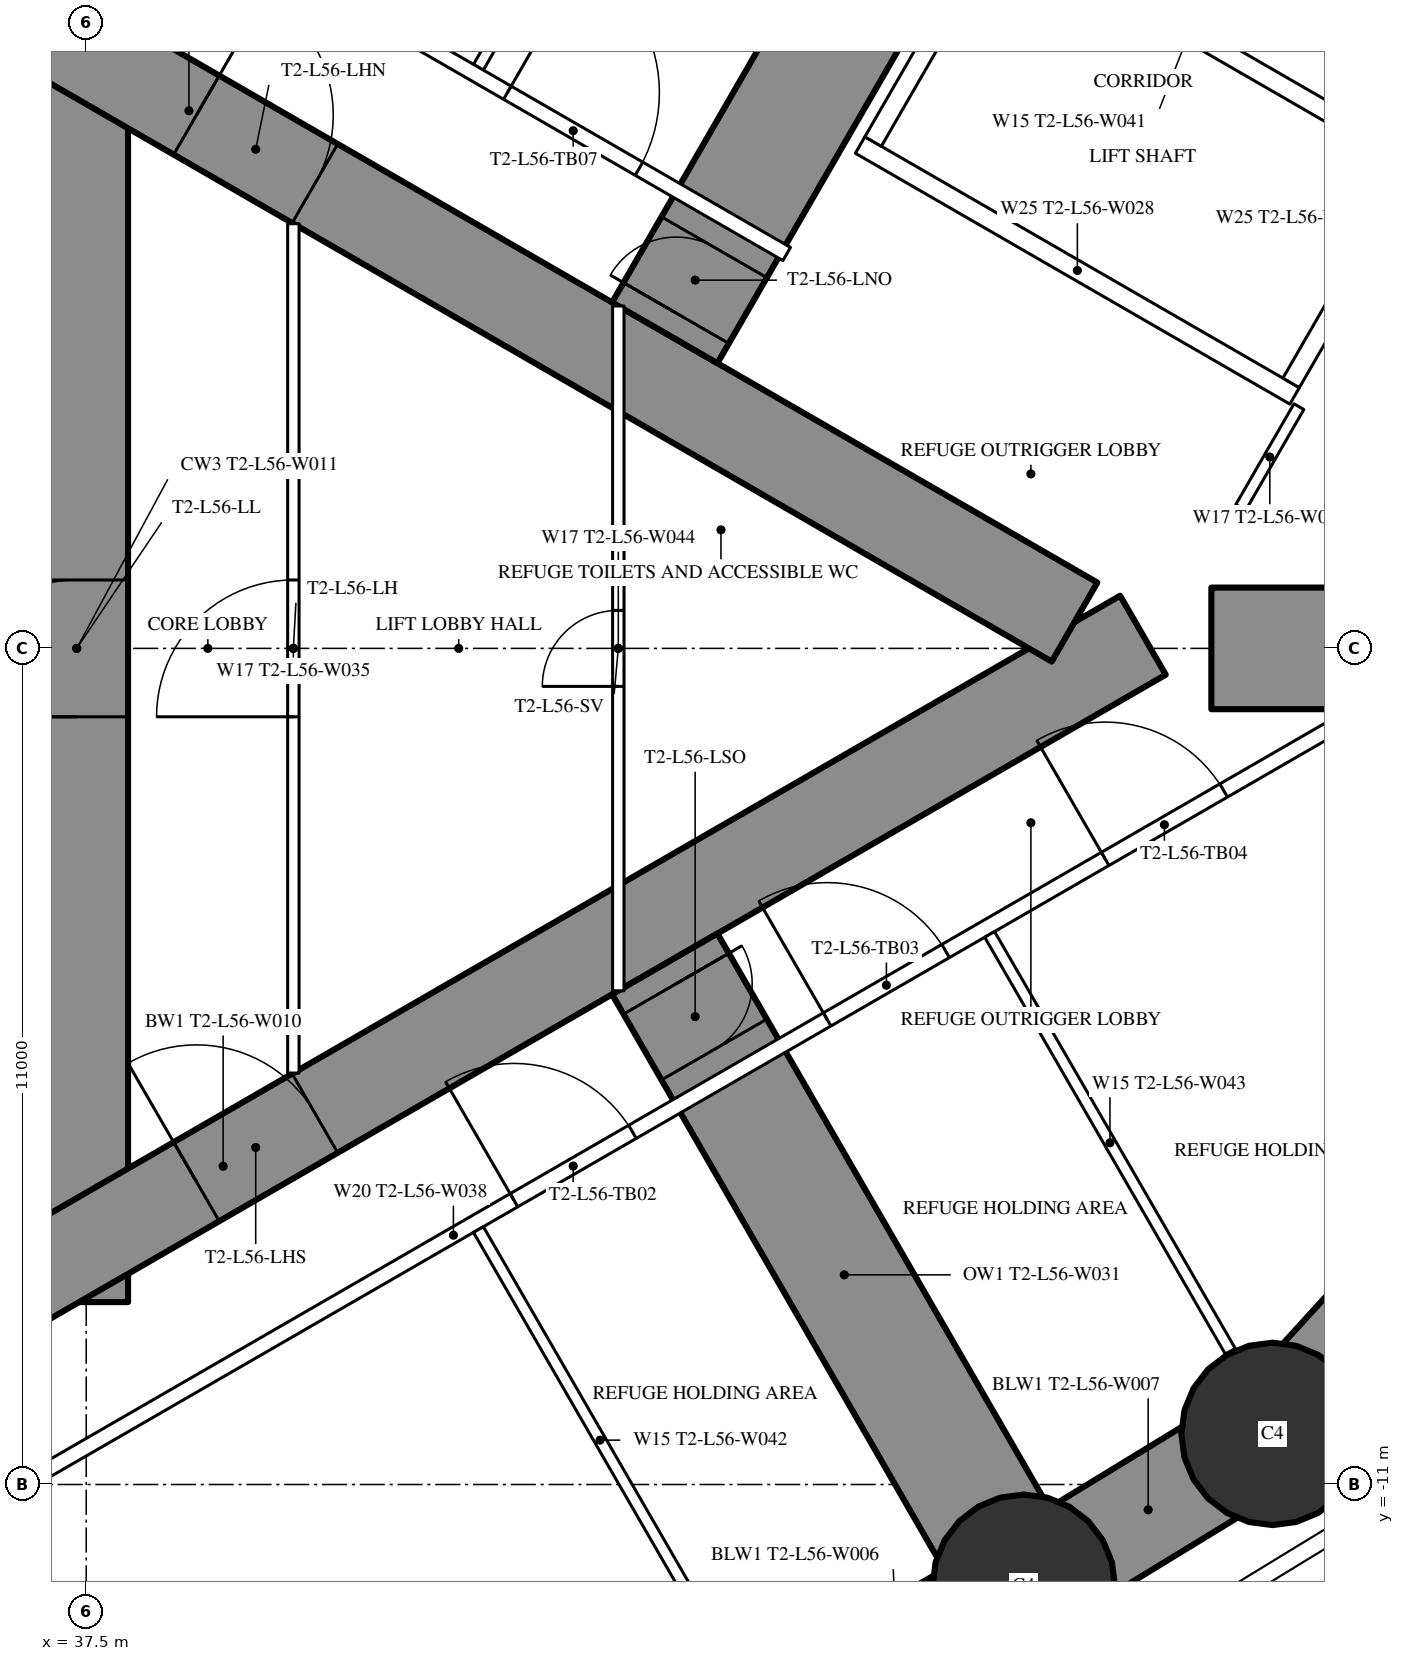
"""IFC4 building model, lengths in metres.
Left out: names, types, materials, properties, quantities, classifications, styles, units other than length and angle.
Written with IfcOpenShell. Run it as: python <this file> out.ifc"""

import sys

from ifc_helpers import new_model, si_unit, direction, frame, frame_2d, origin, origin_2d, place, context, subcontext, project, spatial, rectangle, circle, extrude, element, fill, save


model = new_model("IFC4")
c1 = context("Model", 3, precision=1e-05, world=origin(), true_north=direction((0.0, 1.0)))
c2 = subcontext(c1, "Body", "Model", "MODEL_VIEW")
j1 = project(units=[si_unit("LENGTHUNIT", "METRE"), si_unit("PLANEANGLEUNIT", "RADIAN")], contexts=[c1])
p1 = place(None, origin())
s1 = spatial("IfcSite", under=j1, at=p1, CompositionType="ELEMENT")
p2 = place(p1, origin())
s2 = spatial("IfcBuilding", under=s1, at=p2, CompositionType="ELEMENT")
p3 = place(p2, frame((0.0, 0.0, 210.3)))
s3 = spatial("IfcBuildingStorey", under=s2, at=p3, CompositionType="ELEMENT", Elevation=210.3)
for number, where, z_axis, x_axis in (
    (1, (49.834, -12.332, 0.0), (0.0, 0.0, 1.0), (1.0, 0.0, 0.0)),
    (2, (53.108, -10.334, 0.0), (0.0, 0.0, 1.0), (1.0, 0.0, 0.0)),
):
    element("IfcColumn", number, at=place(p3, frame(where, z_axis=z_axis, x_axis=x_axis)), inside=s3, PredefinedType="COLUMN", context=c2, shape_type="SweptSolid", body=[
        extrude(circle(Radius=1.2, at=origin_2d()), origin(), (0.0, 0.0, 1.0), 5.0),
    ])
p4 = place(p3, frame((37.375, -8.6, 0.0), z_axis=(0.0, 0.0, 1.0), x_axis=(0.0, 1.0, 0.0)))
e3 = element("IfcWall", 3, at=p4, inside=s3, PredefinedType="SHEAR", context=c2, shape_type="SweptSolid", body=[
    extrude(rectangle(XDim=17.2, YDim=1.35, at=frame_2d((8.6, 0.0))), origin(), (0.0, 0.0, 1.0), 5.0),
])
p5 = place(p4, frame((7.7, 0.0, 0.0)))
e4 = element("IfcOpeningElement", 4, at=p5, cuts=e3, PredefinedType="OPENING", context=c2, shape_type="SweptSolid", body=[
    extrude(rectangle(XDim=1.8, YDim=2.2, at=frame_2d((0.9, 1.1))), frame((0.0, 0.685, 0.0), z_axis=(0.0, -1.0, 0.0), x_axis=(1.0, 0.0, 0.0)), (0.0, 0.0, 1.0), 1.37),
])
p6 = place(p3, frame((27.2, -13.8, 0.0), z_axis=(0.0, 0.0, 1.0), x_axis=(0.866027159892, 0.499996958321, 0.0)))
e5 = element("IfcWall", 5, at=p6, inside=s3, PredefinedType="SHEAR", context=c2, shape_type="SweptSolid", body=[
    extrude(rectangle(XDim=27.947, YDim=1.2, at=frame_2d((13.973, 0.0))), origin(), (0.0, 0.0, 1.0), 5.0),
])
p7 = place(p6, frame((6.5, 0.0, 0.0)))
e6 = element("IfcOpeningElement", 6, at=p7, cuts=e5, PredefinedType="OPENING", context=c2, shape_type="SweptSolid", body=[
    extrude(rectangle(XDim=1.0, YDim=2.2, at=frame_2d((0.5, 1.1))), frame((0.0, 0.61, 0.0), z_axis=(0.0, -1.0, 0.0), x_axis=(1.0, 0.0, 0.0)), (0.0, 0.0, 1.0), 1.22),
])
p8 = place(p6, frame((13.568, 0.0, 0.0)))
e7 = element("IfcOpeningElement", 7, at=p8, cuts=e5, PredefinedType="OPENING", context=c2, shape_type="SweptSolid", body=[
    extrude(rectangle(XDim=1.8, YDim=2.2, at=frame_2d((0.9, 1.1))), frame((0.0, 0.61, 0.0), z_axis=(0.0, -1.0, 0.0), x_axis=(1.0, 0.0, 0.0)), (0.0, 0.0, 1.0), 1.22),
])
p9 = place(p3, frame((27.2, 13.8, 0.0), z_axis=(0.0, 0.0, 1.0), x_axis=(0.866024515034, -0.500001539357, 0.0)))
e8 = element("IfcWall", 8, at=p9, inside=s3, PredefinedType="SHEAR", context=c2, shape_type="SweptSolid", body=[
    extrude(rectangle(XDim=26.907, YDim=1.2, at=frame_2d((13.454, 0.0))), origin(), (0.0, 0.0, 1.0), 5.0),
])
p10 = place(p9, frame((6.5, 0.0, 0.0)))
e9 = element("IfcOpeningElement", 9, at=p10, cuts=e8, PredefinedType="OPENING", context=c2, shape_type="SweptSolid", body=[
    extrude(rectangle(XDim=1.0, YDim=2.2, at=frame_2d((0.5, 1.1))), frame((0.0, 0.61, 0.0), z_axis=(0.0, -1.0, 0.0), x_axis=(1.0, 0.0, 0.0)), (0.0, 0.0, 1.0), 1.22),
])
p11 = place(p9, frame((13.568, 0.0, 0.0)))
e10 = element("IfcOpeningElement", 10, at=p11, cuts=e8, PredefinedType="OPENING", context=c2, shape_type="SweptSolid", body=[
    extrude(rectangle(XDim=1.8, YDim=2.2, at=frame_2d((0.9, 1.1))), frame((0.0, 0.61, 0.0), z_axis=(0.0, -1.0, 0.0), x_axis=(1.0, 0.0, 0.0)), (0.0, 0.0, 1.0), 1.22),
])
p12 = place(p3, frame((45.111, -4.152, 0.0), z_axis=(0.0, 0.0, 1.0), x_axis=(0.499986466662, -0.86603321712, 0.0)))
e11 = element("IfcWall", 11, at=p12, inside=s3, PredefinedType="SHEAR", context=c2, shape_type="SweptSolid", body=[
    extrude(rectangle(XDim=9.446, YDim=1.6, at=frame_2d((4.723, 0.0))), origin(), (0.0, 0.0, 1.0), 5.0),
])
p13 = place(p12, frame((0.3, 0.0, 0.0)))
e12 = element("IfcOpeningElement", 12, at=p13, cuts=e11, PredefinedType="OPENING", context=c2, shape_type="SweptSolid", body=[
    extrude(rectangle(XDim=1.0, YDim=2.2, at=frame_2d((0.5, 1.1))), frame((0.0, 0.81, 0.0), z_axis=(0.0, -1.0, 0.0), x_axis=(1.0, 0.0, 0.0)), (0.0, 0.0, 1.0), 1.62),
])
p14 = place(p3, frame((52.302, 0.0, 0.0), z_axis=(0.0, 0.0, 1.0), x_axis=(1.0, 0.0, 0.0)))
e13 = element("IfcWall", 13, at=p14, inside=s3, PredefinedType="SHEAR", context=c2, shape_type="SweptSolid", body=[
    extrude(rectangle(XDim=10.239, YDim=1.6, at=frame_2d((5.12, 0.0))), origin(), (0.0, 0.0, 1.0), 5.0),
])
p15 = place(p3, frame((45.111, 4.152, 0.0), z_axis=(0.0, 0.0, 1.0), x_axis=(0.499986466662, 0.86603321712, 0.0)))
e14 = element("IfcWall", 14, at=p15, inside=s3, PredefinedType="SHEAR", context=c2, shape_type="SweptSolid", body=[
    extrude(rectangle(XDim=9.446, YDim=1.6, at=frame_2d((4.723, 0.0))), origin(), (0.0, 0.0, 1.0), 5.0),
])
p16 = place(p15, frame((0.3, 0.0, 0.0)))
e15 = element("IfcOpeningElement", 15, at=p16, cuts=e14, PredefinedType="OPENING", context=c2, shape_type="SweptSolid", body=[
    extrude(rectangle(XDim=1.0, YDim=2.2, at=frame_2d((0.5, 1.1))), frame((0.0, 0.81, 0.0), z_axis=(0.0, -1.0, 0.0), x_axis=(1.0, 0.0, 0.0)), (0.0, 0.0, 1.0), 1.62),
])
p17 = place(p3, frame((46.499, -14.226, 0.0), z_axis=(0.0, 0.0, 1.0), x_axis=(0.869560321562, 0.493826738001, 0.0)))
e16 = element("IfcWall", 16, at=p17, inside=s3, PredefinedType="SHEAR", context=c2, shape_type="SweptSolid", body=[
    extrude(rectangle(XDim=3.835, YDim=1.4, at=frame_2d((1.917, 0.0))), origin(), (0.0, 0.0, 1.0), 5.0),
])
p18 = place(p3, frame((49.834, -12.332, 0.0), z_axis=(0.0, 0.0, 1.0), x_axis=(0.853604257265, 0.520922040212, 0.0)))
e17 = element("IfcWall", 17, at=p18, inside=s3, PredefinedType="SHEAR", context=c2, shape_type="SweptSolid", body=[
    extrude(rectangle(XDim=3.835, YDim=1.4, at=frame_2d((1.917, 0.0))), origin(), (0.0, 0.0, 1.0), 5.0),
])
p19 = place(p3, frame((53.108, -10.334, 0.0), z_axis=(0.0, 0.0, 1.0), x_axis=(0.674209372947, 0.738540263919, 0.0)))
e18 = element("IfcWall", 18, at=p19, inside=s3, PredefinedType="SHEAR", context=c2, shape_type="SweptSolid", body=[
    extrude(rectangle(XDim=13.992, YDim=1.4, at=frame_2d((6.996, 0.0))), origin(), (0.0, 0.0, 1.0), 5.0),
])
p20 = place(p19, frame((5.496, 0.0, 0.6)))
e19 = element("IfcOpeningElement", 19, at=p20, cuts=e18, PredefinedType="OPENING", context=c2, shape_type="SweptSolid", body=[
    extrude(rectangle(XDim=3.0, YDim=1.2, at=frame_2d((1.5, 0.6))), frame((0.0, 0.71, 0.0), z_axis=(0.0, -1.0, 0.0), x_axis=(1.0, 0.0, 0.0)), (0.0, 0.0, 1.0), 1.42),
])
p21 = place(p3, frame((62.542, 0.0, 0.0), z_axis=(0.0, 0.0, 1.0), x_axis=(-0.674209372947, 0.738540263919, 0.0)))
e20 = element("IfcWall", 20, at=p21, inside=s3, PredefinedType="SHEAR", context=c2, shape_type="SweptSolid", body=[
    extrude(rectangle(XDim=13.992, YDim=1.4, at=frame_2d((6.996, 0.0))), origin(), (0.0, 0.0, 1.0), 5.0),
])
p22 = place(p21, frame((5.496, 0.0, 0.6)))
e21 = element("IfcOpeningElement", 21, at=p22, cuts=e20, PredefinedType="OPENING", context=c2, shape_type="SweptSolid", body=[
    extrude(rectangle(XDim=3.0, YDim=1.2, at=frame_2d((1.5, 0.6))), frame((0.0, 0.71, 0.0), z_axis=(0.0, -1.0, 0.0), x_axis=(1.0, 0.0, 0.0)), (0.0, 0.0, 1.0), 1.42),
])
p23 = place(p3, frame((28.959, -15.44, 0.0), z_axis=(0.0, 0.0, 1.0), x_axis=(0.866025227435, 0.500000305447, 0.0)))
e22 = element("IfcWall", 22, at=p23, inside=s3, PredefinedType="PARTITIONING", context=c2, shape_type="SweptSolid", body=[
    extrude(rectangle(XDim=30.88, YDim=0.2, at=frame_2d((15.44, 0.0))), origin(), (0.0, 0.0, 1.0), 4.75),
])
p24 = place(p23, frame((6.994, 0.0, 0.0)))
e23 = element("IfcOpeningElement", 23, at=p24, cuts=e22, PredefinedType="OPENING", context=c2, shape_type="SweptSolid", body=[
    extrude(rectangle(XDim=2.0, YDim=2.4, at=frame_2d((1.0, 1.2))), frame((0.0, 0.11, 0.0), z_axis=(0.0, -1.0, 0.0), x_axis=(1.0, 0.0, 0.0)), (0.0, 0.0, 1.0), 0.22),
])
p25 = place(p23, frame((16.36, 0.0, 0.0)))
e24 = element("IfcOpeningElement", 24, at=p25, cuts=e22, PredefinedType="OPENING", context=c2, shape_type="SweptSolid", body=[
    extrude(rectangle(XDim=1.8, YDim=2.2, at=frame_2d((0.9, 1.1))), frame((0.0, 0.11, 0.0), z_axis=(0.0, -1.0, 0.0), x_axis=(1.0, 0.0, 0.0)), (0.0, 0.0, 1.0), 0.22),
])
p26 = place(p23, frame((21.118, 0.0, 0.0)))
e25 = element("IfcOpeningElement", 25, at=p26, cuts=e22, PredefinedType="OPENING", context=c2, shape_type="SweptSolid", body=[
    extrude(rectangle(XDim=1.8, YDim=2.2, at=frame_2d((0.9, 1.1))), frame((0.0, 0.11, 0.0), z_axis=(0.0, -1.0, 0.0), x_axis=(1.0, 0.0, 0.0)), (0.0, 0.0, 1.0), 0.22),
])
p27 = place(p23, frame((25.341, 0.0, 0.0)))
e26 = element("IfcOpeningElement", 26, at=p27, cuts=e22, PredefinedType="OPENING", context=c2, shape_type="SweptSolid", body=[
    extrude(rectangle(XDim=1.8, YDim=2.2, at=frame_2d((0.9, 1.1))), frame((0.0, 0.11, 0.0), z_axis=(0.0, -1.0, 0.0), x_axis=(1.0, 0.0, 0.0)), (0.0, 0.0, 1.0), 0.22),
])
p28 = place(p3, frame((42.66, -7.646, 0.0), z_axis=(0.0, 0.0, 1.0), x_axis=(0.499996592859, -0.866027370889, 0.0)))
e27 = element("IfcWall", 27, at=p28, inside=s3, PredefinedType="PARTITIONING", context=c2, shape_type="SweptSolid", body=[
    extrude(rectangle(XDim=6.398, YDim=0.15, at=frame_2d((3.199, 0.0))), origin(), (0.0, 0.0, 1.0), 3.85),
])
p29 = place(p3, frame((49.385, -3.763, 0.0), z_axis=(0.0, 0.0, 1.0), x_axis=(0.499999447814, -0.866025722589, 0.0)))
e28 = element("IfcWall", 28, at=p29, inside=s3, PredefinedType="PARTITIONING", context=c2, shape_type="SweptSolid", body=[
    extrude(rectangle(XDim=6.333, YDim=0.15, at=frame_2d((3.166, 0.0))), origin(), (0.0, 0.0, 1.0), 3.85),
])
p30 = place(p3, frame((42.66, 7.646, 0.0), z_axis=(0.0, 0.0, 1.0), x_axis=(0.499996592859, 0.866027370889, 0.0)))
e29 = element("IfcWall", 29, at=p30, inside=s3, PredefinedType="PARTITIONING", context=c2, shape_type="SweptSolid", body=[
    extrude(rectangle(XDim=6.398, YDim=0.15, at=frame_2d((3.199, 0.0))), origin(), (0.0, 0.0, 1.0), 3.85),
])
p31 = place(p3, frame((28.959, 15.44, 0.0), z_axis=(0.0, 0.0, 1.0), x_axis=(0.866028936079, -0.499993881836, 0.0)))
e30 = element("IfcWall", 30, at=p31, inside=s3, PredefinedType="PARTITIONING", context=c2, shape_type="SweptSolid", body=[
    extrude(rectangle(XDim=20.503, YDim=0.2, at=frame_2d((10.251, 0.0))), origin(), (0.0, 0.0, 1.0), 4.75),
])
p32 = place(p31, frame((16.26, 0.0, 0.0)))
e31 = element("IfcOpeningElement", 31, at=p32, cuts=e30, PredefinedType="OPENING", context=c2, shape_type="SweptSolid", body=[
    extrude(rectangle(XDim=2.0, YDim=2.4, at=frame_2d((1.0, 1.2))), frame((0.0, 0.11, 0.0), z_axis=(0.0, -1.0, 0.0), x_axis=(1.0, 0.0, 0.0)), (0.0, 0.0, 1.0), 0.22),
])
p33 = place(p31, frame((7.094, 0.0, 0.0)))
e32 = element("IfcOpeningElement", 32, at=p33, cuts=e30, PredefinedType="OPENING", context=c2, shape_type="SweptSolid", body=[
    extrude(rectangle(XDim=1.8, YDim=2.2, at=frame_2d((0.9, 1.1))), frame((0.0, 0.11, 0.0), z_axis=(0.0, -1.0, 0.0), x_axis=(1.0, 0.0, 0.0)), (0.0, 0.0, 1.0), 0.22),
])
p34 = place(p3, frame((52.689, 1.855, 0.0), z_axis=(0.0, 0.0, 1.0), x_axis=(0.500035603698, 0.866004847004, 0.0)))
e33 = element("IfcWall", 33, at=p34, inside=s3, PredefinedType="PARTITIONING", context=c2, shape_type="SweptSolid", body=[
    extrude(rectangle(XDim=1.53, YDim=0.15, at=frame_2d((0.765, 0.0))), origin(), (0.0, 0.0, 1.0), 4.75),
])
p35 = place(p3, frame((40.225, -5.587, 0.0), z_axis=(0.0, 0.0, 1.0), x_axis=(0.0, 1.0, 0.0)))
e34 = element("IfcWall", 34, at=p35, inside=s3, PredefinedType="PARTITIONING", context=c2, shape_type="SweptSolid", body=[
    extrude(rectangle(XDim=11.174, YDim=0.15, at=frame_2d((5.587, 0.0))), origin(), (0.0, 0.0, 1.0), 4.75),
])
p36 = place(p35, frame((4.687, 0.0, 0.0)))
e35 = element("IfcOpeningElement", 35, at=p36, cuts=e34, PredefinedType="OPENING", context=c2, shape_type="SweptSolid", body=[
    extrude(rectangle(XDim=1.8, YDim=2.2, at=frame_2d((0.9, 1.1))), frame((0.0, 0.085, 0.0), z_axis=(0.0, -1.0, 0.0), x_axis=(1.0, 0.0, 0.0)), (0.0, 0.0, 1.0), 0.17),
])
p37 = place(p3, frame((44.5, -4.505, 0.0), z_axis=(0.0, 0.0, 1.0), x_axis=(0.0, 1.0, 0.0)))
e36 = element("IfcWall", 36, at=p37, inside=s3, PredefinedType="PARTITIONING", context=c2, shape_type="SweptSolid", body=[
    extrude(rectangle(XDim=9.009, YDim=0.15, at=frame_2d((4.505, 0.0))), origin(), (0.0, 0.0, 1.0), 4.75),
])
p38 = place(p37, frame((4.005, 0.0, 0.0)))
e37 = element("IfcOpeningElement", 37, at=p38, cuts=e36, PredefinedType="OPENING", context=c2, shape_type="SweptSolid", body=[
    extrude(rectangle(XDim=1.0, YDim=2.2, at=frame_2d((0.5, 1.1))), frame((0.0, 0.085, 0.0), z_axis=(0.0, -1.0, 0.0), x_axis=(1.0, 0.0, 0.0)), (0.0, 0.0, 1.0), 0.17),
])
for number, where, z_axis, x_axis in (
    (38, (47.681, 6.622, 0.0), (0.0, 0.0, 1.0), (0.866, -0.5, 0.0)),
    (39, (49.406, 9.611, 0.0), (0.0, 0.0, 1.0), (0.866, -0.5, 0.0)),
):
    element("IfcWall", number, at=place(p3, frame(where, z_axis=z_axis, x_axis=x_axis)), inside=s3, PredefinedType="PARTITIONING", context=c2, shape_type="SweptSolid", body=[
        extrude(rectangle(XDim=6.6, YDim=0.25, at=frame_2d((3.3, 0.0))), origin(), (0.0, 0.0, 1.0), 4.75),
    ])
p39 = place(p3, frame((47.852, 6.668, 0.0), z_axis=(0.0, 0.0, 1.0), x_axis=(0.499929347863, 0.866066190972, 0.0)))
e40 = element("IfcWall", 40, at=p39, inside=s3, PredefinedType="PARTITIONING", context=c2, shape_type="SweptSolid", body=[
    extrude(rectangle(XDim=3.201, YDim=0.25, at=frame_2d((1.6, 0.0))), origin(), (0.0, 0.0, 1.0), 4.75),
])
p40 = place(p3, frame((53.352, 3.493, 0.0), z_axis=(0.0, 0.0, 1.0), x_axis=(0.499872130319, 0.866099216793, 0.0)))
e41 = element("IfcWall", 41, at=p40, inside=s3, PredefinedType="PARTITIONING", context=c2, shape_type="SweptSolid", body=[
    extrude(rectangle(XDim=3.2, YDim=0.25, at=frame_2d((1.6, 0.0))), origin(), (0.0, 0.0, 1.0), 4.75),
])
p41 = place(p13, origin())
e42 = element("IfcDoor", 42, at=p41, inside=s3, OperationType="SINGLE_SWING_LEFT", PredefinedType="DOOR", context=c2, shape_type="SweptSolid", body=[
    extrude(rectangle(XDim=1.0, YDim=2.2, at=frame_2d((0.5, 1.1))), frame((0.0, 0.025, 0.0), z_axis=(0.0, -1.0, 0.0), x_axis=(1.0, 0.0, 0.0)), (0.0, 0.0, 1.0), 0.05),
])
fill(e12, e42)
p42 = place(p16, origin())
e43 = element("IfcDoor", 43, at=p42, inside=s3, OperationType="SINGLE_SWING_LEFT", PredefinedType="DOOR", context=c2, shape_type="SweptSolid", body=[
    extrude(rectangle(XDim=1.0, YDim=2.2, at=frame_2d((0.5, 1.1))), frame((0.0, 0.025, 0.0), z_axis=(0.0, -1.0, 0.0), x_axis=(1.0, 0.0, 0.0)), (0.0, 0.0, 1.0), 0.05),
])
fill(e15, e43)
p43 = place(p25, origin())
e44 = element("IfcDoor", 44, at=p43, inside=s3, OperationType="DOUBLE_DOOR_SINGLE_SWING", PredefinedType="DOOR", context=c2, shape_type="SweptSolid", body=[
    extrude(rectangle(XDim=1.8, YDim=2.2, at=frame_2d((0.9, 1.1))), frame((0.0, 0.025, 0.0), z_axis=(0.0, -1.0, 0.0), x_axis=(1.0, 0.0, 0.0)), (0.0, 0.0, 1.0), 0.05),
])
fill(e24, e44)
p44 = place(p26, origin())
e45 = element("IfcDoor", 45, at=p44, inside=s3, OperationType="DOUBLE_DOOR_SINGLE_SWING", PredefinedType="DOOR", context=c2, shape_type="SweptSolid", body=[
    extrude(rectangle(XDim=1.8, YDim=2.2, at=frame_2d((0.9, 1.1))), frame((0.0, 0.025, 0.0), z_axis=(0.0, -1.0, 0.0), x_axis=(1.0, 0.0, 0.0)), (0.0, 0.0, 1.0), 0.05),
])
fill(e25, e45)
p45 = place(p27, origin())
e46 = element("IfcDoor", 46, at=p45, inside=s3, OperationType="DOUBLE_DOOR_SINGLE_SWING", PredefinedType="DOOR", context=c2, shape_type="SweptSolid", body=[
    extrude(rectangle(XDim=1.8, YDim=2.2, at=frame_2d((0.9, 1.1))), frame((0.0, 0.025, 0.0), z_axis=(0.0, -1.0, 0.0), x_axis=(1.0, 0.0, 0.0)), (0.0, 0.0, 1.0), 0.05),
])
fill(e26, e46)
p46 = place(p32, origin())
e47 = element("IfcDoor", 47, at=p46, inside=s3, OperationType="DOUBLE_DOOR_SINGLE_SWING", PredefinedType="DOOR", context=c2, shape_type="SweptSolid", body=[
    extrude(rectangle(XDim=2.0, YDim=2.4, at=frame_2d((1.0, 1.2))), frame((0.0, 0.025, 0.0), z_axis=(0.0, -1.0, 0.0), x_axis=(1.0, 0.0, 0.0)), (0.0, 0.0, 1.0), 0.05),
])
fill(e31, e47)
p47 = place(p36, origin())
e48 = element("IfcDoor", 48, at=p47, inside=s3, OperationType="DOUBLE_DOOR_SINGLE_SWING", PredefinedType="DOOR", context=c2, shape_type="SweptSolid", body=[
    extrude(rectangle(XDim=1.8, YDim=2.2, at=frame_2d((0.9, 1.1))), frame((0.0, 0.025, 0.0), z_axis=(0.0, -1.0, 0.0), x_axis=(1.0, 0.0, 0.0)), (0.0, 0.0, 1.0), 0.05),
])
fill(e35, e48)
p48 = place(p38, origin())
e49 = element("IfcDoor", 49, at=p48, inside=s3, OperationType="SINGLE_SWING_LEFT", PredefinedType="DOOR", context=c2, shape_type="SweptSolid", body=[
    extrude(rectangle(XDim=1.0, YDim=2.2, at=frame_2d((0.5, 1.1))), frame((0.0, 0.025, 0.0), z_axis=(0.0, -1.0, 0.0), x_axis=(1.0, 0.0, 0.0)), (0.0, 0.0, 1.0), 0.05),
])
fill(e37, e49)
p49 = place(p8, origin())
e50 = element("IfcDoor", 50, at=p49, inside=s3, OperationType="DOUBLE_DOOR_SINGLE_SWING", PredefinedType="DOOR", context=c2, shape_type="SweptSolid", body=[
    extrude(rectangle(XDim=1.8, YDim=2.2, at=frame_2d((0.9, 1.1))), frame((0.0, 0.025, 0.0), z_axis=(0.0, -1.0, 0.0), x_axis=(1.0, 0.0, 0.0)), (0.0, 0.0, 1.0), 0.05),
])
fill(e7, e50)
p50 = place(p11, origin())
e51 = element("IfcDoor", 51, at=p50, inside=s3, OperationType="DOUBLE_DOOR_SINGLE_SWING", PredefinedType="DOOR", context=c2, shape_type="SweptSolid", body=[
    extrude(rectangle(XDim=1.8, YDim=2.2, at=frame_2d((0.9, 1.1))), frame((0.0, 0.025, 0.0), z_axis=(0.0, -1.0, 0.0), x_axis=(1.0, 0.0, 0.0)), (0.0, 0.0, 1.0), 0.05),
])
fill(e10, e51)
p51 = place(p5, origin())
e52 = element("IfcDoor", 52, at=p51, inside=s3, OperationType="DOUBLE_DOOR_SINGLE_SWING", PredefinedType="DOOR", context=c2, shape_type="SweptSolid", body=[
    extrude(rectangle(XDim=1.8, YDim=2.2, at=frame_2d((0.9, 1.1))), frame((0.0, 0.025, 0.0), z_axis=(0.0, -1.0, 0.0), x_axis=(1.0, 0.0, 0.0)), (0.0, 0.0, 1.0), 0.05),
])
fill(e4, e52)
save(model, sys.argv[1])
